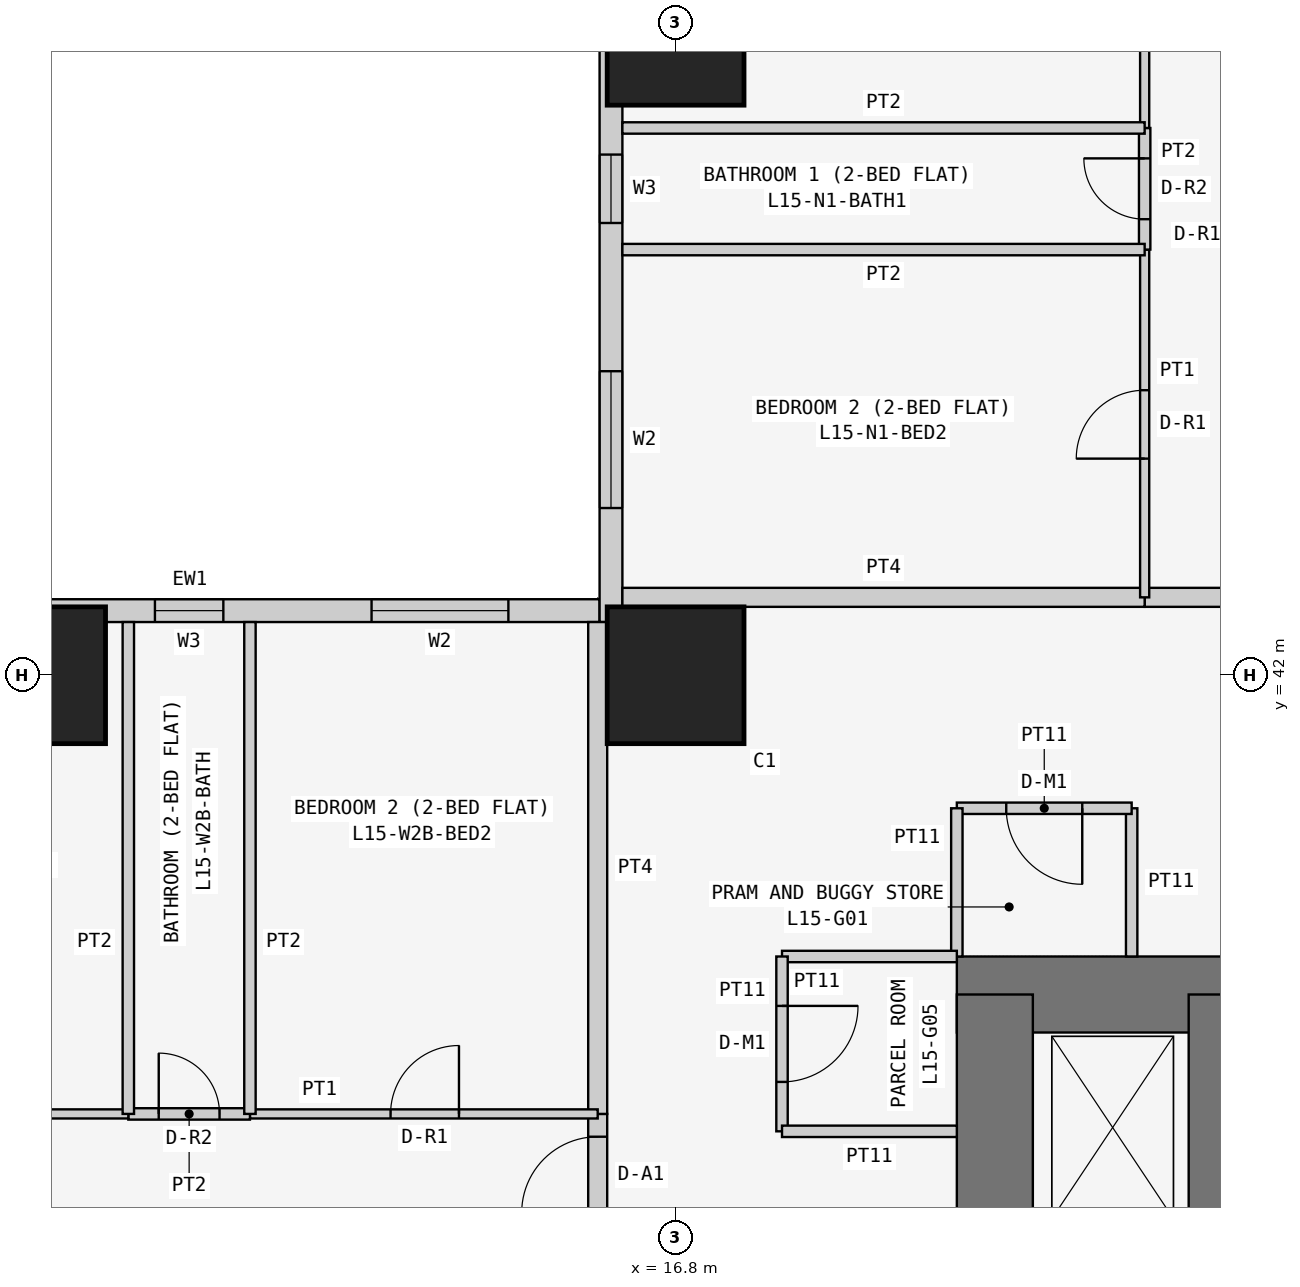
"""IFC4 building model, lengths in metres.
Left out: names, types, materials, properties, quantities, classifications, styles, units other than length and angle.
Written with IfcOpenShell. Run it as: python <this file> out.ifc"""

import sys

from ifc_helpers import new_model, si_unit, direction, frame, frame_2d, origin, origin_2d, place, context, subcontext, project, spatial, rectangle, extrude, element, fill, save


model = new_model("IFC4")
c1 = context("Model", 3, precision=1e-05, world=origin(), true_north=direction((0.0, 1.0)))
c2 = subcontext(c1, "Body", "Model", "MODEL_VIEW")
j1 = project(units=[si_unit("LENGTHUNIT", "METRE"), si_unit("PLANEANGLEUNIT", "RADIAN")], contexts=[c1])
p1 = place(None, origin())
s1 = spatial("IfcSite", under=j1, at=p1, CompositionType="ELEMENT")
p2 = place(p1, origin())
s2 = spatial("IfcBuilding", under=s1, at=p2, CompositionType="ELEMENT")
p3 = place(p2, frame((0.0, 0.0, 63.3)))
s3 = spatial("IfcBuildingStorey", under=s2, at=p3, CompositionType="ELEMENT", Elevation=63.3)
for number, where, z_axis, x_axis in (
    (1, (8.4, 42.0, 0.0), (0.0, 0.0, 1.0), (1.0, 0.0, 0.0)),
    (2, (16.8, 42.0, 0.0), (0.0, 0.0, 1.0), (1.0, 0.0, 0.0)),
    (3, (16.8, 50.4, 0.0), (0.0, 0.0, 1.0), (1.0, 0.0, 0.0)),
):
    element("IfcColumn", number, at=place(p3, frame(where, z_axis=z_axis, x_axis=x_axis)), inside=s3, PredefinedType="COLUMN", context=c2, shape_type="SweptSolid", body=[
        extrude(rectangle(XDim=1.8, YDim=1.8, at=origin_2d()), origin(), (0.0, 0.0, 1.0), 3.6),
    ])
p4 = place(p3, frame((37.8, 37.8, 0.0), z_axis=(0.0, 0.0, 1.0), x_axis=(-1.0, 0.0, 0.0)))
e4 = element("IfcWall", 4, at=p4, inside=s3, PredefinedType="SHEAR", context=c2, shape_type="SweptSolid", body=[
    extrude(rectangle(XDim=17.3, YDim=1.0, at=frame_2d((8.65, 0.0))), origin(), (0.0, 0.0, 1.0), 3.6),
])
p5 = place(p3, frame((21.0, 37.8, 0.0), z_axis=(0.0, 0.0, 1.0), x_axis=(0.0, -1.0, 0.0)))
e5 = element("IfcWall", 5, at=p5, inside=s3, PredefinedType="SHEAR", context=c2, shape_type="SweptSolid", body=[
    extrude(rectangle(XDim=17.3, YDim=1.0, at=frame_2d((8.65, 0.0))), origin(), (0.0, 0.0, 1.0), 3.6),
])
p6 = place(p5, frame((5.4, 0.0, 0.0)))
e6 = element("IfcOpeningElement", 6, at=p6, cuts=e5, PredefinedType="OPENING", context=c2, shape_type="SweptSolid", body=[
    extrude(rectangle(XDim=1.2, YDim=2.1, at=frame_2d((0.6, 1.05))), frame((0.0, 0.51, 0.0), z_axis=(0.0, -1.0, 0.0), x_axis=(1.0, 0.0, 0.0)), (0.0, 0.0, 1.0), 1.02),
])
p7 = place(p3, frame((23.8, 34.6, 0.0), z_axis=(0.0, 0.0, 1.0), x_axis=(0.0, 1.0, 0.0)))
e7 = element("IfcWall", 7, at=p7, inside=s3, PredefinedType="SHEAR", context=c2, shape_type="SweptSolid", body=[
    extrude(rectangle(XDim=3.2, YDim=0.5, at=frame_2d((1.6, 0.0))), origin(), (0.0, 0.0, 1.0), 3.6),
])
p8 = place(p3, frame((15.8, 42.85, 0.0), z_axis=(0.0, 0.0, 1.0), x_axis=(-1.0, 0.0, 0.0)))
e8 = element("IfcWall", 8, at=p8, inside=s3, PredefinedType="SOLIDWALL", context=c2, shape_type="SweptSolid", body=[
    extrude(rectangle(XDim=15.4, YDim=0.3, at=frame_2d((7.7, 0.0))), origin(), (0.0, 0.0, 1.0), 3.45),
])
p9 = place(p8, frame((1.2, 0.0, 0.9)))
e9 = element("IfcOpeningElement", 9, at=p9, cuts=e8, PredefinedType="OPENING", context=c2, shape_type="SweptSolid", body=[
    extrude(rectangle(XDim=1.8, YDim=1.5, at=frame_2d((0.9, 0.75))), frame((0.0, 0.16, 0.0), z_axis=(0.0, -1.0, 0.0), x_axis=(1.0, 0.0, 0.0)), (0.0, 0.0, 1.0), 0.32),
])
p10 = place(p8, frame((4.95, 0.0, 1.5)))
e10 = element("IfcOpeningElement", 10, at=p10, cuts=e8, PredefinedType="OPENING", context=c2, shape_type="SweptSolid", body=[
    extrude(rectangle(XDim=0.9, YDim=0.7, at=frame_2d((0.45, 0.35))), frame((0.0, 0.16, 0.0), z_axis=(0.0, -1.0, 0.0), x_axis=(1.0, 0.0, 0.0)), (0.0, 0.0, 1.0), 0.32),
])
p11 = place(p8, frame((8.5, 0.0, 0.9)))
e11 = element("IfcOpeningElement", 11, at=p11, cuts=e8, PredefinedType="OPENING", context=c2, shape_type="SweptSolid", body=[
    extrude(rectangle(XDim=1.8, YDim=1.5, at=frame_2d((0.9, 0.75))), frame((0.0, 0.16, 0.0), z_axis=(0.0, -1.0, 0.0), x_axis=(1.0, 0.0, 0.0)), (0.0, 0.0, 1.0), 0.32),
])
p12 = place(p8, frame((12.5, 0.0, 0.0)))
e12 = element("IfcOpeningElement", 12, at=p12, cuts=e8, PredefinedType="OPENING", context=c2, shape_type="SweptSolid", body=[
    extrude(rectangle(XDim=0.9, YDim=2.4, at=frame_2d((0.45, 1.2))), frame((0.0, 0.16, 0.0), z_axis=(0.0, -1.0, 0.0), x_axis=(1.0, 0.0, 0.0)), (0.0, 0.0, 1.0), 0.32),
])
p13 = place(p8, frame((13.5, 0.0, 0.9)))
e13 = element("IfcOpeningElement", 13, at=p13, cuts=e8, PredefinedType="OPENING", context=c2, shape_type="SweptSolid", body=[
    extrude(rectangle(XDim=1.2, YDim=1.5, at=frame_2d((0.6, 0.75))), frame((0.0, 0.16, 0.0), z_axis=(0.0, -1.0, 0.0), x_axis=(1.0, 0.0, 0.0)), (0.0, 0.0, 1.0), 0.32),
])
p14 = place(p3, frame((15.95, 58.4, 0.0), z_axis=(0.0, 0.0, 1.0), x_axis=(0.0, -1.0, 0.0)))
e14 = element("IfcWall", 14, at=p14, inside=s3, PredefinedType="SOLIDWALL", context=c2, shape_type="SweptSolid", body=[
    extrude(rectangle(XDim=15.7, YDim=0.3, at=frame_2d((7.85, 0.0))), origin(), (0.0, 0.0, 1.0), 3.45),
])
p15 = place(p14, frame((12.4, 0.0, 0.9)))
e15 = element("IfcOpeningElement", 15, at=p15, cuts=e14, PredefinedType="OPENING", context=c2, shape_type="SweptSolid", body=[
    extrude(rectangle(XDim=1.8, YDim=1.5, at=frame_2d((0.9, 0.75))), frame((0.0, 0.16, 0.0), z_axis=(0.0, -1.0, 0.0), x_axis=(1.0, 0.0, 0.0)), (0.0, 0.0, 1.0), 0.32),
])
p16 = place(p14, frame((9.55, 0.0, 1.5)))
e16 = element("IfcOpeningElement", 16, at=p16, cuts=e14, PredefinedType="OPENING", context=c2, shape_type="SweptSolid", body=[
    extrude(rectangle(XDim=0.9, YDim=0.7, at=frame_2d((0.45, 0.35))), frame((0.0, 0.16, 0.0), z_axis=(0.0, -1.0, 0.0), x_axis=(1.0, 0.0, 0.0)), (0.0, 0.0, 1.0), 0.32),
])
p17 = place(p14, frame((5.1, 0.0, 0.9)))
e17 = element("IfcOpeningElement", 17, at=p17, cuts=e14, PredefinedType="OPENING", context=c2, shape_type="SweptSolid", body=[
    extrude(rectangle(XDim=1.8, YDim=1.5, at=frame_2d((0.9, 0.75))), frame((0.0, 0.16, 0.0), z_axis=(0.0, -1.0, 0.0), x_axis=(1.0, 0.0, 0.0)), (0.0, 0.0, 1.0), 0.32),
])
p18 = place(p14, frame((2.0, 0.0, 0.0)))
e18 = element("IfcOpeningElement", 18, at=p18, cuts=e14, PredefinedType="OPENING", context=c2, shape_type="SweptSolid", body=[
    extrude(rectangle(XDim=0.9, YDim=2.4, at=frame_2d((0.45, 1.2))), frame((0.0, 0.16, 0.0), z_axis=(0.0, -1.0, 0.0), x_axis=(1.0, 0.0, 0.0)), (0.0, 0.0, 1.0), 0.32),
])
p19 = place(p14, frame((0.7, 0.0, 0.9)))
e19 = element("IfcOpeningElement", 19, at=p19, cuts=e14, PredefinedType="OPENING", context=c2, shape_type="SweptSolid", body=[
    extrude(rectangle(XDim=1.2, YDim=1.5, at=frame_2d((0.6, 0.75))), frame((0.0, 0.16, 0.0), z_axis=(0.0, -1.0, 0.0), x_axis=(1.0, 0.0, 0.0)), (0.0, 0.0, 1.0), 0.32),
])
p20 = place(p3, frame((22.8, 38.3, 0.0), z_axis=(0.0, 0.0, 1.0), x_axis=(0.0, 1.0, 0.0)))
e20 = element("IfcWall", 20, at=p20, inside=s3, PredefinedType="PARTITIONING", context=c2, shape_type="SweptSolid", body=[
    extrude(rectangle(XDim=1.95, YDim=0.15, at=frame_2d((0.975, 0.0))), origin(), (0.0, 0.0, 1.0), 3.45),
])
p21 = place(p3, frame((22.8, 40.25, 0.0), z_axis=(0.0, 0.0, 1.0), x_axis=(-1.0, 0.0, 0.0)))
e21 = element("IfcWall", 21, at=p21, inside=s3, PredefinedType="PARTITIONING", context=c2, shape_type="SweptSolid", body=[
    extrude(rectangle(XDim=2.3, YDim=0.15, at=frame_2d((1.15, 0.0))), origin(), (0.0, 0.0, 1.0), 3.45),
])
p22 = place(p21, frame((0.65, 0.0, 0.0)))
e22 = element("IfcOpeningElement", 22, at=p22, cuts=e21, PredefinedType="OPENING", context=c2, shape_type="SweptSolid", body=[
    extrude(rectangle(XDim=1.0, YDim=2.1, at=frame_2d((0.5, 1.05))), frame((0.0, 0.085, 0.0), z_axis=(0.0, -1.0, 0.0), x_axis=(1.0, 0.0, 0.0)), (0.0, 0.0, 1.0), 0.17),
])
p23 = place(p3, frame((20.5, 40.25, 0.0), z_axis=(0.0, 0.0, 1.0), x_axis=(0.0, -1.0, 0.0)))
e23 = element("IfcWall", 23, at=p23, inside=s3, PredefinedType="PARTITIONING", context=c2, shape_type="SweptSolid", body=[
    extrude(rectangle(XDim=1.95, YDim=0.15, at=frame_2d((0.975, 0.0))), origin(), (0.0, 0.0, 1.0), 3.45),
])
p24 = place(p3, frame((20.5, 38.3, 0.0), z_axis=(0.0, 0.0, 1.0), x_axis=(-1.0, 0.0, 0.0)))
e24 = element("IfcWall", 24, at=p24, inside=s3, PredefinedType="PARTITIONING", context=c2, shape_type="SweptSolid", body=[
    extrude(rectangle(XDim=2.3, YDim=0.15, at=frame_2d((1.15, 0.0))), origin(), (0.0, 0.0, 1.0), 3.45),
])
p25 = place(p3, frame((18.2, 38.3, 0.0), z_axis=(0.0, 0.0, 1.0), x_axis=(0.0, -1.0, 0.0)))
e25 = element("IfcWall", 25, at=p25, inside=s3, PredefinedType="PARTITIONING", context=c2, shape_type="SweptSolid", body=[
    extrude(rectangle(XDim=2.3, YDim=0.15, at=frame_2d((1.15, 0.0))), origin(), (0.0, 0.0, 1.0), 3.45),
])
p26 = place(p25, frame((0.65, 0.0, 0.0)))
e26 = element("IfcOpeningElement", 26, at=p26, cuts=e25, PredefinedType="OPENING", context=c2, shape_type="SweptSolid", body=[
    extrude(rectangle(XDim=1.0, YDim=2.1, at=frame_2d((0.5, 1.05))), frame((0.0, 0.085, 0.0), z_axis=(0.0, -1.0, 0.0), x_axis=(1.0, 0.0, 0.0)), (0.0, 0.0, 1.0), 0.17),
])
p27 = place(p3, frame((18.2, 36.0, 0.0), z_axis=(0.0, 0.0, 1.0), x_axis=(1.0, 0.0, 0.0)))
e27 = element("IfcWall", 27, at=p27, inside=s3, PredefinedType="PARTITIONING", context=c2, shape_type="SweptSolid", body=[
    extrude(rectangle(XDim=2.3, YDim=0.15, at=frame_2d((1.15, 0.0))), origin(), (0.0, 0.0, 1.0), 3.45),
])
p28 = place(p3, frame((22.971, 43.025, 0.0), z_axis=(0.0, 0.0, 1.0), x_axis=(1.0, 0.0, 0.0)))
e28 = element("IfcWall", 28, at=p28, inside=s3, PredefinedType="PARTITIONING", context=c2, shape_type="SweptSolid", body=[
    extrude(rectangle(XDim=1.2, YDim=0.25, at=frame_2d((0.6, 0.0))), origin(), (0.0, 0.0, 1.0), 3.45),
])
p29 = place(p3, frame((16.1, 43.025, 0.0), z_axis=(0.0, 0.0, 1.0), x_axis=(1.0, 0.0, 0.0)))
e29 = element("IfcWall", 29, at=p29, inside=s3, PredefinedType="PARTITIONING", context=c2, shape_type="SweptSolid", body=[
    extrude(rectangle(XDim=6.871, YDim=0.25, at=frame_2d((3.436, 0.0))), origin(), (0.0, 0.0, 1.0), 3.45),
])
p30 = place(p3, frame((15.775, 34.629, 0.0), z_axis=(0.0, 0.0, 1.0), x_axis=(0.0, 1.0, 0.0)))
e30 = element("IfcWall", 30, at=p30, inside=s3, PredefinedType="PARTITIONING", context=c2, shape_type="SweptSolid", body=[
    extrude(rectangle(XDim=1.6, YDim=0.25, at=frame_2d((0.8, 0.0))), origin(), (0.0, 0.0, 1.0), 3.45),
])
p31 = place(p30, frame((0.3, 0.0, 0.0)))
e31 = element("IfcOpeningElement", 31, at=p31, cuts=e30, PredefinedType="OPENING", context=c2, shape_type="SweptSolid", body=[
    extrude(rectangle(XDim=1.0, YDim=2.1, at=frame_2d((0.5, 1.05))), frame((0.0, 0.135, 0.0), z_axis=(0.0, -1.0, 0.0), x_axis=(1.0, 0.0, 0.0)), (0.0, 0.0, 1.0), 0.27),
])
p32 = place(p3, frame((15.775, 36.229, 0.0), z_axis=(0.0, 0.0, 1.0), x_axis=(0.0, 1.0, 0.0)))
e32 = element("IfcWall", 32, at=p32, inside=s3, PredefinedType="PARTITIONING", context=c2, shape_type="SweptSolid", body=[
    extrude(rectangle(XDim=6.471, YDim=0.25, at=frame_2d((3.235, 0.0))), origin(), (0.0, 0.0, 1.0), 3.45),
])
p33 = place(p3, frame((22.971, 47.6, 0.0), z_axis=(0.0, 0.0, 1.0), x_axis=(0.0, -1.0, 0.0)))
e33 = element("IfcWall", 33, at=p33, inside=s3, PredefinedType="PARTITIONING", context=c2, shape_type="SweptSolid", body=[
    extrude(rectangle(XDim=4.575, YDim=0.12, at=frame_2d((2.288, 0.0))), origin(), (0.0, 0.0, 1.0), 3.45),
])
p34 = place(p33, frame((1.85, 0.0, 0.0)))
e34 = element("IfcOpeningElement", 34, at=p34, cuts=e33, PredefinedType="OPENING", context=c2, shape_type="SweptSolid", body=[
    extrude(rectangle(XDim=0.9, YDim=2.1, at=frame_2d((0.45, 1.05))), frame((0.0, 0.07, 0.0), z_axis=(0.0, -1.0, 0.0), x_axis=(1.0, 0.0, 0.0)), (0.0, 0.0, 1.0), 0.14),
])
p35 = place(p3, frame((22.971, 49.2, 0.0), z_axis=(0.0, 0.0, 1.0), x_axis=(0.0, -1.0, 0.0)))
e35 = element("IfcWall", 35, at=p35, inside=s3, PredefinedType="PARTITIONING", context=c2, shape_type="SweptSolid", body=[
    extrude(rectangle(XDim=1.6, YDim=0.15, at=frame_2d((0.8, 0.0))), origin(), (0.0, 0.0, 1.0), 3.45),
])
p36 = place(p35, frame((0.4, 0.0, 0.0)))
e36 = element("IfcOpeningElement", 36, at=p36, cuts=e35, PredefinedType="OPENING", context=c2, shape_type="SweptSolid", body=[
    extrude(rectangle(XDim=0.8, YDim=2.1, at=frame_2d((0.4, 1.05))), frame((0.0, 0.085, 0.0), z_axis=(0.0, -1.0, 0.0), x_axis=(1.0, 0.0, 0.0)), (0.0, 0.0, 1.0), 0.17),
])
p37 = place(p3, frame((22.971, 53.0, 0.0), z_axis=(0.0, 0.0, 1.0), x_axis=(0.0, -1.0, 0.0)))
e37 = element("IfcWall", 37, at=p37, inside=s3, PredefinedType="PARTITIONING", context=c2, shape_type="SweptSolid", body=[
    extrude(rectangle(XDim=3.8, YDim=0.12, at=frame_2d((1.9, 0.0))), origin(), (0.0, 0.0, 1.0), 3.45),
])
p38 = place(p37, frame((0.55, 0.0, 0.0)))
e38 = element("IfcOpeningElement", 38, at=p38, cuts=e37, PredefinedType="OPENING", context=c2, shape_type="SweptSolid", body=[
    extrude(rectangle(XDim=0.9, YDim=2.1, at=frame_2d((0.45, 1.05))), frame((0.0, 0.07, 0.0), z_axis=(0.0, -1.0, 0.0), x_axis=(1.0, 0.0, 0.0)), (0.0, 0.0, 1.0), 0.14),
])
for number, where, z_axis, x_axis in (
    (39, (22.971, 47.6, 0.0), (0.0, 0.0, 1.0), (-1.0, 0.0, 0.0)),
    (40, (22.971, 49.2, 0.0), (0.0, 0.0, 1.0), (-1.0, 0.0, 0.0)),
):
    element("IfcWall", number, at=place(p3, frame(where, z_axis=z_axis, x_axis=x_axis)), inside=s3, PredefinedType="PARTITIONING", context=c2, shape_type="SweptSolid", body=[
        extrude(rectangle(XDim=6.871, YDim=0.15, at=frame_2d((3.436, 0.0))), origin(), (0.0, 0.0, 1.0), 3.45),
    ])
p39 = place(p3, frame((11.2, 36.229, 0.0), z_axis=(0.0, 0.0, 1.0), x_axis=(1.0, 0.0, 0.0)))
e41 = element("IfcWall", 41, at=p39, inside=s3, PredefinedType="PARTITIONING", context=c2, shape_type="SweptSolid", body=[
    extrude(rectangle(XDim=4.575, YDim=0.12, at=frame_2d((2.288, 0.0))), origin(), (0.0, 0.0, 1.0), 3.45),
])
p40 = place(p39, frame((1.85, 0.0, 0.0)))
e42 = element("IfcOpeningElement", 42, at=p40, cuts=e41, PredefinedType="OPENING", context=c2, shape_type="SweptSolid", body=[
    extrude(rectangle(XDim=0.9, YDim=2.1, at=frame_2d((0.45, 1.05))), frame((0.0, 0.07, 0.0), z_axis=(0.0, -1.0, 0.0), x_axis=(1.0, 0.0, 0.0)), (0.0, 0.0, 1.0), 0.14),
])
p41 = place(p3, frame((9.6, 36.229, 0.0), z_axis=(0.0, 0.0, 1.0), x_axis=(1.0, 0.0, 0.0)))
e43 = element("IfcWall", 43, at=p41, inside=s3, PredefinedType="PARTITIONING", context=c2, shape_type="SweptSolid", body=[
    extrude(rectangle(XDim=1.6, YDim=0.15, at=frame_2d((0.8, 0.0))), origin(), (0.0, 0.0, 1.0), 3.45),
])
p42 = place(p41, frame((0.4, 0.0, 0.0)))
e44 = element("IfcOpeningElement", 44, at=p42, cuts=e43, PredefinedType="OPENING", context=c2, shape_type="SweptSolid", body=[
    extrude(rectangle(XDim=0.8, YDim=2.1, at=frame_2d((0.4, 1.05))), frame((0.0, 0.085, 0.0), z_axis=(0.0, -1.0, 0.0), x_axis=(1.0, 0.0, 0.0)), (0.0, 0.0, 1.0), 0.17),
])
p43 = place(p3, frame((4.7, 36.229, 0.0), z_axis=(0.0, 0.0, 1.0), x_axis=(1.0, 0.0, 0.0)))
e45 = element("IfcWall", 45, at=p43, inside=s3, PredefinedType="PARTITIONING", context=c2, shape_type="SweptSolid", body=[
    extrude(rectangle(XDim=4.9, YDim=0.12, at=frame_2d((2.45, 0.0))), origin(), (0.0, 0.0, 1.0), 3.45),
])
p44 = place(p43, frame((1.65, 0.0, 0.0)))
e46 = element("IfcOpeningElement", 46, at=p44, cuts=e45, PredefinedType="OPENING", context=c2, shape_type="SweptSolid", body=[
    extrude(rectangle(XDim=0.9, YDim=2.1, at=frame_2d((0.45, 1.05))), frame((0.0, 0.07, 0.0), z_axis=(0.0, -1.0, 0.0), x_axis=(1.0, 0.0, 0.0)), (0.0, 0.0, 1.0), 0.14),
])
for number, where, z_axis, x_axis in (
    (47, (11.2, 36.229, 0.0), (0.0, 0.0, 1.0), (0.0, 1.0, 0.0)),
    (48, (9.6, 36.229, 0.0), (0.0, 0.0, 1.0), (0.0, 1.0, 0.0)),
):
    element("IfcWall", number, at=place(p3, frame(where, z_axis=z_axis, x_axis=x_axis)), inside=s3, PredefinedType="PARTITIONING", context=c2, shape_type="SweptSolid", body=[
        extrude(rectangle(XDim=6.471, YDim=0.15, at=frame_2d((3.235, 0.0))), origin(), (0.0, 0.0, 1.0), 3.45),
    ])
p45 = place(p15, origin())
e49 = element("IfcWindow", 49, at=p45, inside=s3, PartitioningType="SINGLE_PANEL", PredefinedType="WINDOW", context=c2, shape_type="SweptSolid", body=[
    extrude(rectangle(XDim=1.8, YDim=1.5, at=frame_2d((0.9, 0.75))), frame((0.0, 0.03, 0.0), z_axis=(0.0, -1.0, 0.0), x_axis=(1.0, 0.0, 0.0)), (0.0, 0.0, 1.0), 0.06),
])
fill(e15, e49)
p46 = place(p16, origin())
e50 = element("IfcWindow", 50, at=p46, inside=s3, PartitioningType="SINGLE_PANEL", PredefinedType="WINDOW", context=c2, shape_type="SweptSolid", body=[
    extrude(rectangle(XDim=0.9, YDim=0.7, at=frame_2d((0.45, 0.35))), frame((0.0, 0.03, 0.0), z_axis=(0.0, -1.0, 0.0), x_axis=(1.0, 0.0, 0.0)), (0.0, 0.0, 1.0), 0.06),
])
fill(e16, e50)
p47 = place(p9, origin())
e51 = element("IfcWindow", 51, at=p47, inside=s3, PartitioningType="SINGLE_PANEL", PredefinedType="WINDOW", context=c2, shape_type="SweptSolid", body=[
    extrude(rectangle(XDim=1.8, YDim=1.5, at=frame_2d((0.9, 0.75))), frame((0.0, 0.03, 0.0), z_axis=(0.0, -1.0, 0.0), x_axis=(1.0, 0.0, 0.0)), (0.0, 0.0, 1.0), 0.06),
])
fill(e9, e51)
p48 = place(p10, origin())
e52 = element("IfcWindow", 52, at=p48, inside=s3, PartitioningType="SINGLE_PANEL", PredefinedType="WINDOW", context=c2, shape_type="SweptSolid", body=[
    extrude(rectangle(XDim=0.9, YDim=0.7, at=frame_2d((0.45, 0.35))), frame((0.0, 0.03, 0.0), z_axis=(0.0, -1.0, 0.0), x_axis=(1.0, 0.0, 0.0)), (0.0, 0.0, 1.0), 0.06),
])
fill(e10, e52)
p49 = place(p22, origin())
e53 = element("IfcDoor", 53, at=p49, inside=s3, OperationType="SINGLE_SWING_LEFT", PredefinedType="DOOR", context=c2, shape_type="SweptSolid", body=[
    extrude(rectangle(XDim=1.0, YDim=2.1, at=frame_2d((0.5, 1.05))), frame((0.0, 0.025, 0.0), z_axis=(0.0, -1.0, 0.0), x_axis=(1.0, 0.0, 0.0)), (0.0, 0.0, 1.0), 0.05),
])
fill(e22, e53)
p50 = place(p26, origin())
e54 = element("IfcDoor", 54, at=p50, inside=s3, OperationType="SINGLE_SWING_LEFT", PredefinedType="DOOR", context=c2, shape_type="SweptSolid", body=[
    extrude(rectangle(XDim=1.0, YDim=2.1, at=frame_2d((0.5, 1.05))), frame((0.0, 0.025, 0.0), z_axis=(0.0, -1.0, 0.0), x_axis=(1.0, 0.0, 0.0)), (0.0, 0.0, 1.0), 0.05),
])
fill(e26, e54)
p51 = place(p34, frame((0.9, 0.0, 0.0), z_axis=(0.0, 0.0, 1.0), x_axis=(-1.0, 0.0, 0.0)))
e55 = element("IfcDoor", 55, at=p51, inside=s3, OperationType="SINGLE_SWING_LEFT", PredefinedType="DOOR", context=c2, shape_type="SweptSolid", body=[
    extrude(rectangle(XDim=0.9, YDim=2.1, at=frame_2d((0.45, 1.05))), frame((0.0, 0.025, 0.0), z_axis=(0.0, -1.0, 0.0), x_axis=(1.0, 0.0, 0.0)), (0.0, 0.0, 1.0), 0.05),
])
fill(e34, e55)
p52 = place(p36, frame((0.8, 0.0, 0.0), z_axis=(0.0, 0.0, 1.0), x_axis=(-1.0, 0.0, 0.0)))
e56 = element("IfcDoor", 56, at=p52, inside=s3, OperationType="SINGLE_SWING_RIGHT", PredefinedType="DOOR", context=c2, shape_type="SweptSolid", body=[
    extrude(rectangle(XDim=0.8, YDim=2.1, at=frame_2d((0.4, 1.05))), frame((0.0, 0.025, 0.0), z_axis=(0.0, -1.0, 0.0), x_axis=(1.0, 0.0, 0.0)), (0.0, 0.0, 1.0), 0.05),
])
fill(e36, e56)
p53 = place(p31, origin())
e57 = element("IfcDoor", 57, at=p53, inside=s3, OperationType="SINGLE_SWING_LEFT", PredefinedType="DOOR", context=c2, shape_type="SweptSolid", body=[
    extrude(rectangle(XDim=1.0, YDim=2.1, at=frame_2d((0.5, 1.05))), frame((0.0, 0.025, 0.0), z_axis=(0.0, -1.0, 0.0), x_axis=(1.0, 0.0, 0.0)), (0.0, 0.0, 1.0), 0.05),
])
fill(e31, e57)
p54 = place(p40, origin())
e58 = element("IfcDoor", 58, at=p54, inside=s3, OperationType="SINGLE_SWING_RIGHT", PredefinedType="DOOR", context=c2, shape_type="SweptSolid", body=[
    extrude(rectangle(XDim=0.9, YDim=2.1, at=frame_2d((0.45, 1.05))), frame((0.0, 0.025, 0.0), z_axis=(0.0, -1.0, 0.0), x_axis=(1.0, 0.0, 0.0)), (0.0, 0.0, 1.0), 0.05),
])
fill(e42, e58)
p55 = place(p42, origin())
e59 = element("IfcDoor", 59, at=p55, inside=s3, OperationType="SINGLE_SWING_LEFT", PredefinedType="DOOR", context=c2, shape_type="SweptSolid", body=[
    extrude(rectangle(XDim=0.8, YDim=2.1, at=frame_2d((0.4, 1.05))), frame((0.0, 0.025, 0.0), z_axis=(0.0, -1.0, 0.0), x_axis=(1.0, 0.0, 0.0)), (0.0, 0.0, 1.0), 0.05),
])
fill(e44, e59)
save(model, sys.argv[1])
